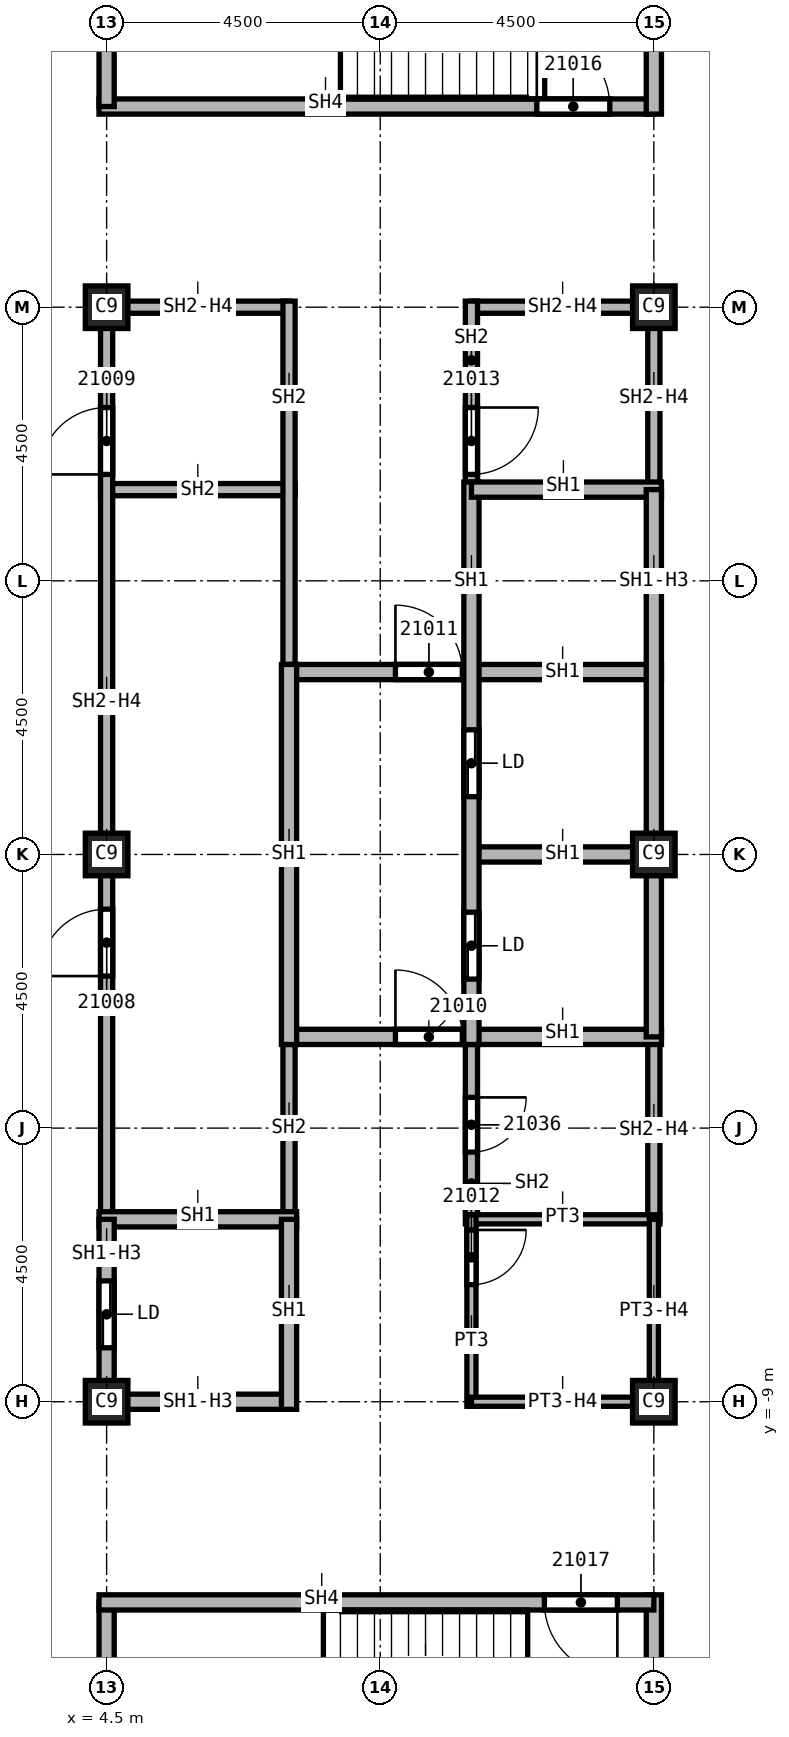
"""IFC4 building model, lengths in metres.
Left out: names, types, materials, properties, quantities, classifications, styles, units other than length and angle.
Written with IfcOpenShell. Run it as: python <this file> out.ifc"""

import sys

from ifc_helpers import new_model, si_unit, direction, frame, frame_2d, origin, origin_2d, place, context, subcontext, project, spatial, rectangle, extrude, element, fill, save


model = new_model("IFC4")
c1 = context("Model", 3, precision=1e-05, world=origin(), true_north=direction((0.0, 1.0)))
c2 = subcontext(c1, "Body", "Model", "MODEL_VIEW")
j1 = project(units=[si_unit("LENGTHUNIT", "METRE"), si_unit("PLANEANGLEUNIT", "RADIAN")], contexts=[c1])
p1 = place(None, origin())
s1 = spatial("IfcSite", under=j1, at=p1, CompositionType="ELEMENT")
p2 = place(p1, origin())
s2 = spatial("IfcBuilding", under=s1, at=p2, CompositionType="ELEMENT")
p3 = place(p2, frame((0.0, 0.0, 308.0)))
s3 = spatial("IfcBuildingStorey", under=s2, at=p3, CompositionType="ELEMENT", Elevation=308.0)
for number, where, z_axis, x_axis in (
    (1, (4.5, 0.0, 0.0), (0.0, 0.0, 1.0), (1.0, 0.0, 0.0)),
    (2, (4.5, 9.0, 0.0), (0.0, 0.0, 1.0), (1.0, 0.0, 0.0)),
    (3, (4.5, -9.0, 0.0), (0.0, 0.0, 1.0), (1.0, 0.0, 0.0)),
    (4, (13.5, 0.0, 0.0), (0.0, 0.0, 1.0), (1.0, 0.0, 0.0)),
    (5, (13.5, 9.0, 0.0), (0.0, 0.0, 1.0), (1.0, 0.0, 0.0)),
    (6, (13.5, -9.0, 0.0), (0.0, 0.0, 1.0), (1.0, 0.0, 0.0)),
):
    element("IfcColumn", number, at=place(p3, frame(where, z_axis=z_axis, x_axis=x_axis)), inside=s3, PredefinedType="COLUMN", context=c2, shape_type="SweptSolid", body=[
        extrude(rectangle(XDim=0.7, YDim=0.7, at=origin_2d()), origin(), (0.0, 0.0, 1.0), 3.74),
    ])
p4 = place(p3, frame((4.4, 6.0, 0.0), z_axis=(0.0, 0.0, 1.0), x_axis=(1.0, 0.0, 0.0)))
e7 = element("IfcWall", 7, at=p4, inside=s3, PredefinedType="SOLIDWALL", context=c2, shape_type="SweptSolid", body=[
    extrude(rectangle(XDim=3.2, YDim=0.2, at=frame_2d((1.6, 0.0))), origin(), (0.0, 0.0, 1.0), 3.74),
])
p5 = place(p3, frame((4.5, -6.0, 0.0), z_axis=(0.0, 0.0, 1.0), x_axis=(0.0, 1.0, 0.0)))
e8 = element("IfcWall", 8, at=p5, inside=s3, PredefinedType="SOLIDWALL", context=c2, shape_type="SweptSolid", body=[
    extrude(rectangle(XDim=15.1, YDim=0.2, at=frame_2d((7.55, 0.0))), origin(), (0.0, 0.0, 1.0), 3.062),
])
p6 = place(p5, frame((4.0, 0.0, 0.0)))
e9 = element("IfcOpeningElement", 9, at=p6, cuts=e8, PredefinedType="OPENING", context=c2, shape_type="SweptSolid", body=[
    extrude(rectangle(XDim=1.1, YDim=2.1, at=frame_2d((0.55, 1.05))), frame((0.0, 0.1, 0.0), z_axis=(0.0, -1.0, 0.0), x_axis=(1.0, 0.0, 0.0)), (0.0, 0.0, 1.0), 0.2),
])
p7 = place(p5, frame((12.25, 0.0, 0.0)))
e10 = element("IfcOpeningElement", 10, at=p7, cuts=e8, PredefinedType="OPENING", context=c2, shape_type="SweptSolid", body=[
    extrude(rectangle(XDim=1.1, YDim=2.1, at=frame_2d((0.55, 1.05))), frame((0.0, 0.1, 0.0), z_axis=(0.0, -1.0, 0.0), x_axis=(1.0, 0.0, 0.0)), (0.0, 0.0, 1.0), 0.2),
])
p8 = place(p3, frame((4.5, 9.0, 0.0), z_axis=(0.0, 0.0, 1.0), x_axis=(1.0, 0.0, 0.0)))
e11 = element("IfcWall", 11, at=p8, inside=s3, PredefinedType="SOLIDWALL", context=c2, shape_type="SweptSolid", body=[
    extrude(rectangle(XDim=3.0, YDim=0.2, at=frame_2d((1.5, 0.0))), origin(), (0.0, 0.0, 1.0), 3.062),
])
p9 = place(p3, frame((7.5, -2.875, 0.0), z_axis=(0.0, 0.0, 1.0), x_axis=(0.0, -1.0, 0.0)))
e12 = element("IfcWall", 12, at=p9, inside=s3, PredefinedType="SOLIDWALL", context=c2, shape_type="SweptSolid", body=[
    extrude(rectangle(XDim=3.125, YDim=0.2, at=frame_2d((1.562, 0.0))), origin(), (0.0, 0.0, 1.0), 3.74),
])
p10 = place(p3, frame((7.5, 9.1, 0.0), z_axis=(0.0, 0.0, 1.0), x_axis=(0.0, -1.0, 0.0)))
e13 = element("IfcWall", 13, at=p10, inside=s3, PredefinedType="SOLIDWALL", context=c2, shape_type="SweptSolid", body=[
    extrude(rectangle(XDim=6.225, YDim=0.2, at=frame_2d((3.113, 0.0))), origin(), (0.0, 0.0, 1.0), 3.74),
])
p11 = place(p3, frame((10.5, -2.875, 0.0), z_axis=(0.0, 0.0, 1.0), x_axis=(0.0, -1.0, 0.0)))
e14 = element("IfcWall", 14, at=p11, inside=s3, PredefinedType="SOLIDWALL", context=c2, shape_type="SweptSolid", body=[
    extrude(rectangle(XDim=3.2, YDim=0.2, at=frame_2d((1.6, 0.0))), origin(), (0.0, 0.0, 1.0), 3.74),
])
p12 = place(p11, frame((1.12, 0.0, 0.0)))
e15 = element("IfcOpeningElement", 15, at=p12, cuts=e14, PredefinedType="OPENING", context=c2, shape_type="SweptSolid", body=[
    extrude(rectangle(XDim=0.9, YDim=2.1, at=frame_2d((0.45, 1.05))), frame((0.0, 0.1, 0.0), z_axis=(0.0, -1.0, 0.0), x_axis=(1.0, 0.0, 0.0)), (0.0, 0.0, 1.0), 0.2),
])
p13 = place(p3, frame((10.5, 9.0, 0.0), z_axis=(0.0, 0.0, 1.0), x_axis=(1.0, 0.0, 0.0)))
e16 = element("IfcWall", 16, at=p13, inside=s3, PredefinedType="SOLIDWALL", context=c2, shape_type="SweptSolid", body=[
    extrude(rectangle(XDim=3.0, YDim=0.2, at=frame_2d((1.5, 0.0))), origin(), (0.0, 0.0, 1.0), 3.062),
])
p14 = place(p3, frame((10.5, 9.1, 0.0), z_axis=(0.0, 0.0, 1.0), x_axis=(0.0, -1.0, 0.0)))
e17 = element("IfcWall", 17, at=p14, inside=s3, PredefinedType="SOLIDWALL", context=c2, shape_type="SweptSolid", body=[
    extrude(rectangle(XDim=3.225, YDim=0.2, at=frame_2d((1.613, 0.0))), origin(), (0.0, 0.0, 1.0), 3.74),
])
p15 = place(p14, frame((1.75, 0.0, 0.0)))
e18 = element("IfcOpeningElement", 18, at=p15, cuts=e17, PredefinedType="OPENING", context=c2, shape_type="SweptSolid", body=[
    extrude(rectangle(XDim=1.1, YDim=2.1, at=frame_2d((0.55, 1.05))), frame((0.0, 0.1, 0.0), z_axis=(0.0, -1.0, 0.0), x_axis=(1.0, 0.0, 0.0)), (0.0, 0.0, 1.0), 0.2),
])
p16 = place(p3, frame((13.5, -3.0, 0.0), z_axis=(0.0, 0.0, 1.0), x_axis=(0.0, -1.0, 0.0)))
e19 = element("IfcWall", 19, at=p16, inside=s3, PredefinedType="SOLIDWALL", context=c2, shape_type="SweptSolid", body=[
    extrude(rectangle(XDim=3.0, YDim=0.2, at=frame_2d((1.5, 0.0))), origin(), (0.0, 0.0, 1.0), 3.062),
])
p17 = place(p3, frame((13.5, 9.1, 0.0), z_axis=(0.0, 0.0, 1.0), x_axis=(0.0, -1.0, 0.0)))
e20 = element("IfcWall", 20, at=p17, inside=s3, PredefinedType="SOLIDWALL", context=c2, shape_type="SweptSolid", body=[
    extrude(rectangle(XDim=3.1, YDim=0.2, at=frame_2d((1.55, 0.0))), origin(), (0.0, 0.0, 1.0), 3.062),
])
p18 = place(p3, frame((4.375, -6.0, 0.0), z_axis=(0.0, 0.0, 1.0), x_axis=(1.0, 0.0, 0.0)))
e21 = element("IfcWall", 21, at=p18, inside=s3, PredefinedType="SOLIDWALL", context=c2, shape_type="SweptSolid", body=[
    extrude(rectangle(XDim=3.25, YDim=0.25, at=frame_2d((1.625, 0.0))), origin(), (0.0, 0.0, 1.0), 3.74),
])
p19 = place(p3, frame((4.5, -9.125, 0.0), z_axis=(0.0, 0.0, 1.0), x_axis=(0.0, 1.0, 0.0)))
e22 = element("IfcWall", 22, at=p19, inside=s3, PredefinedType="SOLIDWALL", context=c2, shape_type="SweptSolid", body=[
    extrude(rectangle(XDim=3.125, YDim=0.25, at=frame_2d((1.562, 0.0))), origin(), (0.0, 0.0, 1.0), 3.062),
])
p20 = place(p19, frame((1.012, 0.0, 0.0)))
e23 = element("IfcOpeningElement", 23, at=p20, cuts=e22, PredefinedType="OPENING", context=c2, shape_type="SweptSolid", body=[
    extrude(rectangle(XDim=1.1, YDim=2.1, at=frame_2d((0.55, 1.05))), frame((0.0, 0.125, 0.0), z_axis=(0.0, -1.0, 0.0), x_axis=(1.0, 0.0, 0.0)), (0.0, 0.0, 1.0), 0.25),
])
p21 = place(p3, frame((7.5, -9.0, 0.0), z_axis=(0.0, 0.0, 1.0), x_axis=(-1.0, 0.0, 0.0)))
e24 = element("IfcWall", 24, at=p21, inside=s3, PredefinedType="SOLIDWALL", context=c2, shape_type="SweptSolid", body=[
    extrude(rectangle(XDim=3.0, YDim=0.25, at=frame_2d((1.5, 0.0))), origin(), (0.0, 0.0, 1.0), 3.062),
])
p22 = place(p3, frame((7.5, -6.0, 0.0), z_axis=(0.0, 0.0, 1.0), x_axis=(0.0, -1.0, 0.0)))
e25 = element("IfcWall", 25, at=p22, inside=s3, PredefinedType="SOLIDWALL", context=c2, shape_type="SweptSolid", body=[
    extrude(rectangle(XDim=3.125, YDim=0.25, at=frame_2d((1.562, 0.0))), origin(), (0.0, 0.0, 1.0), 3.74),
])
p23 = place(p3, frame((7.5, -3.0, 0.0), z_axis=(0.0, 0.0, 1.0), x_axis=(1.0, 0.0, 0.0)))
e26 = element("IfcWall", 26, at=p23, inside=s3, PredefinedType="SOLIDWALL", context=c2, shape_type="SweptSolid", body=[
    extrude(rectangle(XDim=6.125, YDim=0.25, at=frame_2d((3.062, 0.0))), origin(), (0.0, 0.0, 1.0), 3.74),
])
p24 = place(p23, frame((1.75, 0.0, 0.0)))
e27 = element("IfcOpeningElement", 27, at=p24, cuts=e26, PredefinedType="OPENING", context=c2, shape_type="SweptSolid", body=[
    extrude(rectangle(XDim=1.1, YDim=2.1, at=frame_2d((0.55, 1.05))), frame((0.0, 0.125, 0.0), z_axis=(0.0, -1.0, 0.0), x_axis=(1.0, 0.0, 0.0)), (0.0, 0.0, 1.0), 0.25),
])
p25 = place(p3, frame((7.5, 3.0, 0.0), z_axis=(0.0, 0.0, 1.0), x_axis=(1.0, 0.0, 0.0)))
e28 = element("IfcWall", 28, at=p25, inside=s3, PredefinedType="SOLIDWALL", context=c2, shape_type="SweptSolid", body=[
    extrude(rectangle(XDim=6.125, YDim=0.25, at=frame_2d((3.062, 0.0))), origin(), (0.0, 0.0, 1.0), 3.74),
])
p26 = place(p25, frame((1.75, 0.0, 0.0)))
e29 = element("IfcOpeningElement", 29, at=p26, cuts=e28, PredefinedType="OPENING", context=c2, shape_type="SweptSolid", body=[
    extrude(rectangle(XDim=1.1, YDim=2.1, at=frame_2d((0.55, 1.05))), frame((0.0, 0.125, 0.0), z_axis=(0.0, -1.0, 0.0), x_axis=(1.0, 0.0, 0.0)), (0.0, 0.0, 1.0), 0.25),
])
p27 = place(p3, frame((7.5, 3.125, 0.0), z_axis=(0.0, 0.0, 1.0), x_axis=(0.0, -1.0, 0.0)))
e30 = element("IfcWall", 30, at=p27, inside=s3, PredefinedType="SOLIDWALL", context=c2, shape_type="SweptSolid", body=[
    extrude(rectangle(XDim=6.25, YDim=0.25, at=frame_2d((3.125, 0.0))), origin(), (0.0, 0.0, 1.0), 3.74),
])
p28 = place(p3, frame((10.5, 0.0, 0.0), z_axis=(0.0, 0.0, 1.0), x_axis=(1.0, 0.0, 0.0)))
e31 = element("IfcWall", 31, at=p28, inside=s3, PredefinedType="SOLIDWALL", context=c2, shape_type="SweptSolid", body=[
    extrude(rectangle(XDim=3.125, YDim=0.25, at=frame_2d((1.562, 0.0))), origin(), (0.0, 0.0, 1.0), 3.74),
])
p29 = place(p3, frame((10.5, 6.125, 0.0), z_axis=(0.0, 0.0, 1.0), x_axis=(0.0, -1.0, 0.0)))
e32 = element("IfcWall", 32, at=p29, inside=s3, PredefinedType="SOLIDWALL", context=c2, shape_type="SweptSolid", body=[
    extrude(rectangle(XDim=9.25, YDim=0.25, at=frame_2d((4.625, 0.0))), origin(), (0.0, 0.0, 1.0), 3.74),
])
p30 = place(p29, frame((7.075, 0.0, 0.0)))
e33 = element("IfcOpeningElement", 33, at=p30, cuts=e32, PredefinedType="OPENING", context=c2, shape_type="SweptSolid", body=[
    extrude(rectangle(XDim=1.1, YDim=2.1, at=frame_2d((0.55, 1.05))), frame((0.0, 0.125, 0.0), z_axis=(0.0, -1.0, 0.0), x_axis=(1.0, 0.0, 0.0)), (0.0, 0.0, 1.0), 0.25),
])
p31 = place(p29, frame((4.075, 0.0, 0.0)))
e34 = element("IfcOpeningElement", 34, at=p31, cuts=e32, PredefinedType="OPENING", context=c2, shape_type="SweptSolid", body=[
    extrude(rectangle(XDim=1.1, YDim=2.1, at=frame_2d((0.55, 1.05))), frame((0.0, 0.125, 0.0), z_axis=(0.0, -1.0, 0.0), x_axis=(1.0, 0.0, 0.0)), (0.0, 0.0, 1.0), 0.25),
])
p32 = place(p3, frame((10.5, 6.0, 0.0), z_axis=(0.0, 0.0, 1.0), x_axis=(1.0, 0.0, 0.0)))
e35 = element("IfcWall", 35, at=p32, inside=s3, PredefinedType="SOLIDWALL", context=c2, shape_type="SweptSolid", body=[
    extrude(rectangle(XDim=3.125, YDim=0.25, at=frame_2d((1.562, 0.0))), origin(), (0.0, 0.0, 1.0), 3.74),
])
p33 = place(p3, frame((13.5, 6.0, 0.0), z_axis=(0.0, 0.0, 1.0), x_axis=(0.0, -1.0, 0.0)))
e36 = element("IfcWall", 36, at=p33, inside=s3, PredefinedType="SOLIDWALL", context=c2, shape_type="SweptSolid", body=[
    extrude(rectangle(XDim=9.0, YDim=0.25, at=frame_2d((4.5, 0.0))), origin(), (0.0, 0.0, 1.0), 3.062),
])
p34 = place(p3, frame((4.375, 12.3, 0.0), z_axis=(0.0, 0.0, 1.0), x_axis=(1.0, 0.0, 0.0)))
e37 = element("IfcWall", 37, at=p34, inside=s3, PredefinedType="SOLIDWALL", context=c2, shape_type="SweptSolid", body=[
    extrude(rectangle(XDim=9.125, YDim=0.25, at=frame_2d((4.562, 0.0))), origin(), (0.0, 0.0, 1.0), 3.74),
])
p35 = place(p34, frame((7.2, 0.0, 0.0)))
e38 = element("IfcOpeningElement", 38, at=p35, cuts=e37, PredefinedType="OPENING", context=c2, shape_type="SweptSolid", body=[
    extrude(rectangle(XDim=1.2, YDim=2.1, at=frame_2d((0.6, 1.05))), frame((0.0, 0.125, 0.0), z_axis=(0.0, -1.0, 0.0), x_axis=(1.0, 0.0, 0.0)), (0.0, 0.0, 1.0), 0.25),
])
for number, where, z_axis, x_axis in (
    (39, (4.5, -16.8, 0.0), (0.0, 0.0, 1.0), (0.0, 1.0, 0.0)),
    (40, (4.5, 12.3, 0.0), (0.0, 0.0, 1.0), (0.0, 1.0, 0.0)),
):
    element("IfcWall", number, at=place(p3, frame(where, z_axis=z_axis, x_axis=x_axis)), inside=s3, PredefinedType="SOLIDWALL", context=c2, shape_type="SweptSolid", body=[
        extrude(rectangle(XDim=4.5, YDim=0.25, at=frame_2d((2.25, 0.0))), origin(), (0.0, 0.0, 1.0), 3.74),
    ])
p36 = place(p3, frame((13.5, -16.925, 0.0), z_axis=(0.0, 0.0, 1.0), x_axis=(0.0, 1.0, 0.0)))
e41 = element("IfcWall", 41, at=p36, inside=s3, PredefinedType="SOLIDWALL", context=c2, shape_type="SweptSolid", body=[
    extrude(rectangle(XDim=4.75, YDim=0.25, at=frame_2d((2.375, 0.0))), origin(), (0.0, 0.0, 1.0), 3.74),
])
p37 = place(p3, frame((13.5, -12.3, 0.0), z_axis=(0.0, 0.0, 1.0), x_axis=(-1.0, 0.0, 0.0)))
e42 = element("IfcWall", 42, at=p37, inside=s3, PredefinedType="SOLIDWALL", context=c2, shape_type="SweptSolid", body=[
    extrude(rectangle(XDim=9.125, YDim=0.25, at=frame_2d((4.562, 0.0))), origin(), (0.0, 0.0, 1.0), 3.74),
])
p38 = place(p37, frame((0.6, 0.0, 0.0)))
e43 = element("IfcOpeningElement", 43, at=p38, cuts=e42, PredefinedType="OPENING", context=c2, shape_type="SweptSolid", body=[
    extrude(rectangle(XDim=1.2, YDim=2.1, at=frame_2d((0.6, 1.05))), frame((0.0, 0.125, 0.0), z_axis=(0.0, -1.0, 0.0), x_axis=(1.0, 0.0, 0.0)), (0.0, 0.0, 1.0), 0.25),
])
p39 = place(p3, frame((13.5, 12.175, 0.0), z_axis=(0.0, 0.0, 1.0), x_axis=(0.0, 1.0, 0.0)))
e44 = element("IfcWall", 44, at=p39, inside=s3, PredefinedType="SOLIDWALL", context=c2, shape_type="SweptSolid", body=[
    extrude(rectangle(XDim=4.75, YDim=0.25, at=frame_2d((2.375, 0.0))), origin(), (0.0, 0.0, 1.0), 3.74),
])
p40 = place(p3, frame((10.5, -6.0, 0.0), z_axis=(0.0, 0.0, 1.0), x_axis=(1.0, 0.0, 0.0)))
e45 = element("IfcWall", 45, at=p40, inside=s3, PredefinedType="PARTITIONING", context=c2, shape_type="SweptSolid", body=[
    extrude(rectangle(XDim=3.1, YDim=0.15, at=frame_2d((1.55, 0.0))), origin(), (0.0, 0.0, 1.0), 3.74),
])
p41 = place(p3, frame((10.5, -5.925, 0.0), z_axis=(0.0, 0.0, 1.0), x_axis=(0.0, -1.0, 0.0)))
e46 = element("IfcWall", 46, at=p41, inside=s3, PredefinedType="PARTITIONING", context=c2, shape_type="SweptSolid", body=[
    extrude(rectangle(XDim=3.15, YDim=0.15, at=frame_2d((1.575, 0.0))), origin(), (0.0, 0.0, 1.0), 3.74),
])
p42 = place(p41, frame((0.25, 0.0, 0.0)))
e47 = element("IfcOpeningElement", 47, at=p42, cuts=e46, PredefinedType="OPENING", context=c2, shape_type="SweptSolid", body=[
    extrude(rectangle(XDim=0.9, YDim=2.1, at=frame_2d((0.45, 1.05))), frame((0.0, 0.075, 0.0), z_axis=(0.0, -1.0, 0.0), x_axis=(1.0, 0.0, 0.0)), (0.0, 0.0, 1.0), 0.15),
])
p43 = place(p3, frame((13.5, -9.0, 0.0), z_axis=(0.0, 0.0, 1.0), x_axis=(-1.0, 0.0, 0.0)))
e48 = element("IfcWall", 48, at=p43, inside=s3, PredefinedType="PARTITIONING", context=c2, shape_type="SweptSolid", body=[
    extrude(rectangle(XDim=3.0, YDim=0.15, at=frame_2d((1.5, 0.0))), origin(), (0.0, 0.0, 1.0), 3.062),
])
p44 = place(p3, frame((13.5, -6.0, 0.0), z_axis=(0.0, 0.0, 1.0), x_axis=(0.0, -1.0, 0.0)))
e49 = element("IfcWall", 49, at=p44, inside=s3, PredefinedType="PARTITIONING", context=c2, shape_type="SweptSolid", body=[
    extrude(rectangle(XDim=3.075, YDim=0.15, at=frame_2d((1.538, 0.0))), origin(), (0.0, 0.0, 1.0), 3.062),
])
p45 = place(p6, origin())
e50 = element("IfcDoor", 50, at=p45, inside=s3, OperationType="SINGLE_SWING_LEFT", PredefinedType="DOOR", context=c2, shape_type="SweptSolid", body=[
    extrude(rectangle(XDim=1.1, YDim=2.1, at=frame_2d((0.55, 1.05))), frame((0.0, 0.025, 0.0), z_axis=(0.0, -1.0, 0.0), x_axis=(1.0, 0.0, 0.0)), (0.0, 0.0, 1.0), 0.05),
])
fill(e9, e50)
p46 = place(p7, origin())
e51 = element("IfcDoor", 51, at=p46, inside=s3, OperationType="SINGLE_SWING_RIGHT", PredefinedType="DOOR", context=c2, shape_type="SweptSolid", body=[
    extrude(rectangle(XDim=1.1, YDim=2.1, at=frame_2d((0.55, 1.05))), frame((0.0, 0.025, 0.0), z_axis=(0.0, -1.0, 0.0), x_axis=(1.0, 0.0, 0.0)), (0.0, 0.0, 1.0), 0.05),
])
fill(e10, e51)
p47 = place(p24, origin())
e52 = element("IfcDoor", 52, at=p47, inside=s3, OperationType="SINGLE_SWING_LEFT", PredefinedType="DOOR", context=c2, shape_type="SweptSolid", body=[
    extrude(rectangle(XDim=1.1, YDim=2.1, at=frame_2d((0.55, 1.05))), frame((0.0, 0.025, 0.0), z_axis=(0.0, -1.0, 0.0), x_axis=(1.0, 0.0, 0.0)), (0.0, 0.0, 1.0), 0.05),
])
fill(e27, e52)
p48 = place(p26, origin())
e53 = element("IfcDoor", 53, at=p48, inside=s3, OperationType="SINGLE_SWING_RIGHT", PredefinedType="DOOR", context=c2, shape_type="SweptSolid", body=[
    extrude(rectangle(XDim=1.1, YDim=2.1, at=frame_2d((0.55, 1.05))), frame((0.0, 0.025, 0.0), z_axis=(0.0, -1.0, 0.0), x_axis=(1.0, 0.0, 0.0)), (0.0, 0.0, 1.0), 0.05),
])
fill(e29, e53)
p49 = place(p42, origin())
e54 = element("IfcDoor", 54, at=p49, inside=s3, OperationType="SINGLE_SWING_LEFT", PredefinedType="DOOR", context=c2, shape_type="SweptSolid", body=[
    extrude(rectangle(XDim=0.9, YDim=2.1, at=frame_2d((0.45, 1.05))), frame((0.0, 0.025, 0.0), z_axis=(0.0, -1.0, 0.0), x_axis=(1.0, 0.0, 0.0)), (0.0, 0.0, 1.0), 0.05),
])
fill(e47, e54)
p50 = place(p15, origin())
e55 = element("IfcDoor", 55, at=p50, inside=s3, OperationType="SINGLE_SWING_RIGHT", PredefinedType="DOOR", context=c2, shape_type="SweptSolid", body=[
    extrude(rectangle(XDim=1.1, YDim=2.1, at=frame_2d((0.55, 1.05))), frame((0.0, 0.025, 0.0), z_axis=(0.0, -1.0, 0.0), x_axis=(1.0, 0.0, 0.0)), (0.0, 0.0, 1.0), 0.05),
])
fill(e18, e55)
p51 = place(p35, origin())
e56 = element("IfcDoor", 56, at=p51, inside=s3, OperationType="SINGLE_SWING_LEFT", PredefinedType="DOOR", context=c2, shape_type="SweptSolid", body=[
    extrude(rectangle(XDim=1.2, YDim=2.1, at=frame_2d((0.6, 1.05))), frame((0.0, 0.025, 0.0), z_axis=(0.0, -1.0, 0.0), x_axis=(1.0, 0.0, 0.0)), (0.0, 0.0, 1.0), 0.05),
])
fill(e38, e56)
p52 = place(p38, origin())
e57 = element("IfcDoor", 57, at=p52, inside=s3, OperationType="SINGLE_SWING_RIGHT", PredefinedType="DOOR", context=c2, shape_type="SweptSolid", body=[
    extrude(rectangle(XDim=1.2, YDim=2.1, at=frame_2d((0.6, 1.05))), frame((0.0, 0.025, 0.0), z_axis=(0.0, -1.0, 0.0), x_axis=(1.0, 0.0, 0.0)), (0.0, 0.0, 1.0), 0.05),
])
fill(e43, e57)
p53 = place(p12, origin())
e58 = element("IfcDoor", 58, at=p53, inside=s3, OperationType="SINGLE_SWING_LEFT", PredefinedType="DOOR", context=c2, shape_type="SweptSolid", body=[
    extrude(rectangle(XDim=0.9, YDim=2.1, at=frame_2d((0.45, 1.05))), frame((0.0, 0.025, 0.0), z_axis=(0.0, -1.0, 0.0), x_axis=(1.0, 0.0, 0.0)), (0.0, 0.0, 1.0), 0.05),
])
fill(e15, e58)
p54 = place(p20, origin())
e59 = element("IfcDoor", 59, at=p54, inside=s3, OperationType="SLIDING_TO_LEFT", PredefinedType="DOOR", context=c2, shape_type="SweptSolid", body=[
    extrude(rectangle(XDim=1.1, YDim=2.1, at=frame_2d((0.55, 1.05))), frame((0.0, 0.025, 0.0), z_axis=(0.0, -1.0, 0.0), x_axis=(1.0, 0.0, 0.0)), (0.0, 0.0, 1.0), 0.05),
])
fill(e23, e59)
p55 = place(p30, origin())
e60 = element("IfcDoor", 60, at=p55, inside=s3, OperationType="SLIDING_TO_LEFT", PredefinedType="DOOR", context=c2, shape_type="SweptSolid", body=[
    extrude(rectangle(XDim=1.1, YDim=2.1, at=frame_2d((0.55, 1.05))), frame((0.0, 0.025, 0.0), z_axis=(0.0, -1.0, 0.0), x_axis=(1.0, 0.0, 0.0)), (0.0, 0.0, 1.0), 0.05),
])
fill(e33, e60)
p56 = place(p31, origin())
e61 = element("IfcDoor", 61, at=p56, inside=s3, OperationType="SLIDING_TO_LEFT", PredefinedType="DOOR", context=c2, shape_type="SweptSolid", body=[
    extrude(rectangle(XDim=1.1, YDim=2.1, at=frame_2d((0.55, 1.05))), frame((0.0, 0.025, 0.0), z_axis=(0.0, -1.0, 0.0), x_axis=(1.0, 0.0, 0.0)), (0.0, 0.0, 1.0), 0.05),
])
fill(e34, e61)
save(model, sys.argv[1])
